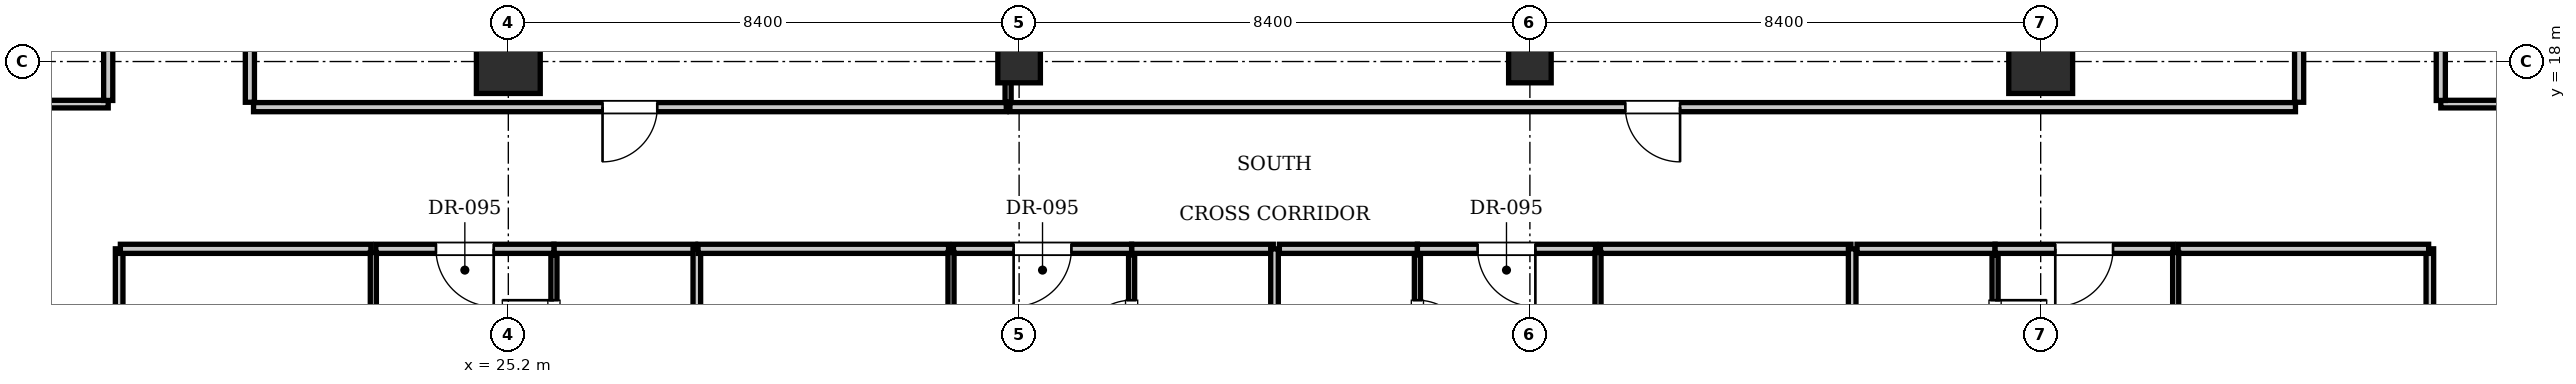
"""IFC4 building model, lengths in metres.
Left out: names, types, materials, properties, quantities, classifications, styles, units other than length and angle.
Written with IfcOpenShell. Run it as: python <this file> out.ifc"""

import sys

from ifc_helpers import new_model, si_unit, direction, frame, frame_2d, origin, origin_2d, place, context, subcontext, project, spatial, rectangle, i_section, extrude, element, fill, save


model = new_model("IFC4")
c1 = context("Model", 3, precision=1e-05, world=origin(), true_north=direction((0.0, 1.0)))
c2 = subcontext(c1, "Body", "Model", "MODEL_VIEW")
j1 = project(units=[si_unit("LENGTHUNIT", "METRE"), si_unit("PLANEANGLEUNIT", "RADIAN")], contexts=[c1])
p1 = place(None, origin())
s1 = spatial("IfcSite", under=j1, at=p1, CompositionType="ELEMENT")
p2 = place(p1, origin())
s2 = spatial("IfcBuilding", under=s1, at=p2, CompositionType="ELEMENT")
p3 = place(p2, frame((0.0, 0.0, 103.95)))
s3 = spatial("IfcBuildingStorey", under=s2, at=p3, CompositionType="ELEMENT", Elevation=103.95)
for number, where, z_axis, x_axis in (
    (1, (25.2, 18.0, 0.0), (0.0, 0.0, 1.0), (1.0, 0.0, 0.0)),
    (2, (50.4, 18.0, 0.0), (0.0, 0.0, 1.0), (1.0, 0.0, 0.0)),
):
    element("IfcColumn", number, at=place(p3, frame(where, z_axis=z_axis, x_axis=x_axis)), inside=s3, PredefinedType="COLUMN", context=c2, shape_type="SweptSolid", body=[
        extrude(rectangle(XDim=1.05, YDim=1.05, at=origin_2d()), origin(), (0.0, 0.0, 1.0), 3.85),
    ])
for number, where, z_axis, x_axis in (
    (3, (33.6, 18.0, 0.0), (0.0, 0.0, 1.0), (1.0, 0.0, 0.0)),
    (4, (42.0, 18.0, 0.0), (0.0, 0.0, 1.0), (1.0, 0.0, 0.0)),
):
    element("IfcColumn", number, at=place(p3, frame(where, z_axis=z_axis, x_axis=x_axis)), inside=s3, PredefinedType="COLUMN", context=c2, shape_type="SweptSolid", body=[
        extrude(i_section(OverallWidth=0.7, OverallDepth=0.7, WebThickness=0.028, FlangeThickness=0.044, at=origin_2d()), origin(), (0.0, 0.0, 1.0), 3.85),
    ])
p4 = place(p3, frame((20.95, 17.33, 0.0), z_axis=(0.0, 0.0, 1.0), x_axis=(0.0, 1.0, 0.0)))
e5 = element("IfcWall", 5, at=p4, inside=s3, PredefinedType="PARTITIONING", context=c2, shape_type="SweptSolid", body=[
    extrude(rectangle(XDim=7.33, YDim=0.15, at=frame_2d((3.665, 0.0))), origin(), (0.0, 0.0, 1.0), 3.255),
])
p5 = place(p3, frame((54.65, 17.33, 0.0), z_axis=(0.0, 0.0, 1.0), x_axis=(0.0, 1.0, 0.0)))
e6 = element("IfcWall", 6, at=p5, inside=s3, PredefinedType="PARTITIONING", context=c2, shape_type="SweptSolid", body=[
    extrude(rectangle(XDim=7.33, YDim=0.15, at=frame_2d((3.665, 0.0))), origin(), (0.0, 0.0, 1.0), 3.293),
])
p6 = place(p3, frame((21.01, 17.25, 0.0), z_axis=(0.0, 0.0, 1.0), x_axis=(1.0, 0.0, 0.0)))
e7 = element("IfcWall", 7, at=p6, inside=s3, PredefinedType="PARTITIONING", context=c2, shape_type="SweptSolid", body=[
    extrude(rectangle(XDim=12.379, YDim=0.15, at=frame_2d((6.189, 0.0))), origin(), (0.0, 0.0, 1.0), 3.61),
])
p7 = place(p6, frame((5.74, 0.0, 0.0)))
e8 = element("IfcOpeningElement", 8, at=p7, cuts=e7, PredefinedType="OPENING", context=c2, shape_type="SweptSolid", body=[
    extrude(rectangle(XDim=0.9, YDim=2.1, at=frame_2d((0.45, 1.05))), frame((0.0, 0.085, 0.0), z_axis=(0.0, -1.0, 0.0), x_axis=(1.0, 0.0, 0.0)), (0.0, 0.0, 1.0), 0.17),
])
p8 = place(p3, frame((33.419, 17.33, 0.0), z_axis=(0.0, 0.0, 1.0), x_axis=(0.0, 1.0, 0.0)))
e9 = element("IfcWall", 9, at=p8, inside=s3, PredefinedType="PARTITIONING", context=c2, shape_type="SweptSolid", body=[
    extrude(rectangle(XDim=7.33, YDim=0.1, at=frame_2d((3.665, 0.0))), origin(), (0.0, 0.0, 1.0), 2.999),
])
p9 = place(p3, frame((33.449, 17.25, 0.0), z_axis=(0.0, 0.0, 1.0), x_axis=(1.0, 0.0, 0.0)))
e10 = element("IfcWall", 10, at=p9, inside=s3, PredefinedType="PARTITIONING", context=c2, shape_type="SweptSolid", body=[
    extrude(rectangle(XDim=21.141, YDim=0.15, at=frame_2d((10.571, 0.0))), origin(), (0.0, 0.0, 1.0), 3.61),
])
p10 = place(p9, frame((10.121, 0.0, 0.0)))
e11 = element("IfcOpeningElement", 11, at=p10, cuts=e10, PredefinedType="OPENING", context=c2, shape_type="SweptSolid", body=[
    extrude(rectangle(XDim=0.9, YDim=2.1, at=frame_2d((0.45, 1.05))), frame((0.0, 0.085, 0.0), z_axis=(0.0, -1.0, 0.0), x_axis=(1.0, 0.0, 0.0)), (0.0, 0.0, 1.0), 0.17),
])
for number, where, z_axis, x_axis in (
    (12, (18.8, 0.1, 0.0), (0.0, 0.0, 1.0), (0.0, 1.0, 0.0)),
    (13, (56.8, 0.1, 0.0), (0.0, 0.0, 1.0), (0.0, 1.0, 0.0)),
):
    element("IfcWall", number, at=place(p3, frame(where, z_axis=z_axis, x_axis=x_axis)), inside=s3, PredefinedType="PARTITIONING", context=c2, shape_type="SweptSolid", body=[
        extrude(rectangle(XDim=14.82, YDim=0.125, at=frame_2d((7.41, 0.0))), origin(), (0.0, 0.0, 1.0), 3.61),
    ])
p11 = place(p3, frame((25.95, 14.92, 0.0), z_axis=(0.0, 0.0, 1.0), x_axis=(1.0, 0.0, 0.0)))
e14 = element("IfcWall", 14, at=p11, inside=s3, PredefinedType="PARTITIONING", context=c2, shape_type="SweptSolid", body=[
    extrude(rectangle(XDim=2.33, YDim=0.15, at=frame_2d((1.165, 0.0))), origin(), (0.0, 0.0, 1.0), 3.61),
])
p12 = place(p3, frame((25.95, 12.48, 0.0), z_axis=(0.0, 0.0, 1.0), x_axis=(0.0, 1.0, 0.0)))
e15 = element("IfcWall", 15, at=p12, inside=s3, PredefinedType="PARTITIONING", context=c2, shape_type="SweptSolid", body=[
    extrude(rectangle(XDim=2.34, YDim=0.1, at=frame_2d((1.17, 0.0))), origin(), (0.0, 0.0, 1.0), 3.61),
])
p13 = place(p12, frame((0.745, 0.0, 0.0)))
e16 = element("IfcOpeningElement", 16, at=p13, cuts=e15, PredefinedType="OPENING", context=c2, shape_type="SweptSolid", body=[
    extrude(rectangle(XDim=0.85, YDim=2.1, at=frame_2d((0.425, 1.05))), frame((0.0, 0.06, 0.0), z_axis=(0.0, -1.0, 0.0), x_axis=(1.0, 0.0, 0.0)), (0.0, 0.0, 1.0), 0.12),
])
p14 = place(p3, frame((18.82, 14.92, 0.0), z_axis=(0.0, 0.0, 1.0), x_axis=(1.0, 0.0, 0.0)))
e17 = element("IfcWall", 17, at=p14, inside=s3, PredefinedType="PARTITIONING", context=c2, shape_type="SweptSolid", body=[
    extrude(rectangle(XDim=4.12, YDim=0.15, at=frame_2d((2.06, 0.0))), origin(), (0.0, 0.0, 1.0), 3.61),
])
p15 = place(p3, frame((23.02, 14.92, 0.0), z_axis=(0.0, 0.0, 1.0), x_axis=(1.0, 0.0, 0.0)))
e18 = element("IfcWall", 18, at=p15, inside=s3, PredefinedType="PARTITIONING", context=c2, shape_type="SweptSolid", body=[
    extrude(rectangle(XDim=2.93, YDim=0.15, at=frame_2d((1.465, 0.0))), origin(), (0.0, 0.0, 1.0), 3.61),
])
p16 = place(p15, frame((0.99, 0.0, 0.0)))
e19 = element("IfcOpeningElement", 19, at=p16, cuts=e18, PredefinedType="OPENING", context=c2, shape_type="SweptSolid", body=[
    extrude(rectangle(XDim=0.95, YDim=2.15, at=frame_2d((0.475, 1.075))), frame((0.0, 0.085, 0.0), z_axis=(0.0, -1.0, 0.0), x_axis=(1.0, 0.0, 0.0)), (0.0, 0.0, 1.0), 0.17),
])
p17 = place(p3, frame((22.98, 0.03, 0.0), z_axis=(0.0, 0.0, 1.0), x_axis=(0.0, 1.0, 0.0)))
e20 = element("IfcWall", 20, at=p17, inside=s3, PredefinedType="PARTITIONING", context=c2, shape_type="SweptSolid", body=[
    extrude(rectangle(XDim=14.83, YDim=0.1, at=frame_2d((7.415, 0.0))), origin(), (0.0, 0.0, 1.0), 3.61),
])
p18 = place(p17, frame((1.6, 0.0, 0.0)))
e21 = element("IfcOpeningElement", 21, at=p18, cuts=e20, PredefinedType="OPENING", context=c2, shape_type="SweptSolid", body=[
    extrude(rectangle(XDim=0.9, YDim=2.1, at=frame_2d((0.45, 1.05))), frame((0.0, 0.06, 0.0), z_axis=(0.0, -1.0, 0.0), x_axis=(1.0, 0.0, 0.0)), (0.0, 0.0, 1.0), 0.12),
])
p19 = place(p3, frame((28.3, 0.1, 0.0), z_axis=(0.0, 0.0, 1.0), x_axis=(0.0, 1.0, 0.0)))
e22 = element("IfcWall", 22, at=p19, inside=s3, PredefinedType="PARTITIONING", context=c2, shape_type="SweptSolid", body=[
    extrude(rectangle(XDim=14.82, YDim=0.125, at=frame_2d((7.41, 0.0))), origin(), (0.0, 0.0, 1.0), 3.61),
])
p20 = place(p3, frame((35.45, 14.92, 0.0), z_axis=(0.0, 0.0, 1.0), x_axis=(1.0, 0.0, 0.0)))
e23 = element("IfcWall", 23, at=p20, inside=s3, PredefinedType="PARTITIONING", context=c2, shape_type="SweptSolid", body=[
    extrude(rectangle(XDim=2.33, YDim=0.15, at=frame_2d((1.165, 0.0))), origin(), (0.0, 0.0, 1.0), 3.61),
])
p21 = place(p3, frame((35.45, 12.48, 0.0), z_axis=(0.0, 0.0, 1.0), x_axis=(0.0, 1.0, 0.0)))
e24 = element("IfcWall", 24, at=p21, inside=s3, PredefinedType="PARTITIONING", context=c2, shape_type="SweptSolid", body=[
    extrude(rectangle(XDim=2.34, YDim=0.1, at=frame_2d((1.17, 0.0))), origin(), (0.0, 0.0, 1.0), 3.61),
])
p22 = place(p21, frame((0.745, 0.0, 0.0)))
e25 = element("IfcOpeningElement", 25, at=p22, cuts=e24, PredefinedType="OPENING", context=c2, shape_type="SweptSolid", body=[
    extrude(rectangle(XDim=0.85, YDim=2.1, at=frame_2d((0.425, 1.05))), frame((0.0, 0.06, 0.0), z_axis=(0.0, -1.0, 0.0), x_axis=(1.0, 0.0, 0.0)), (0.0, 0.0, 1.0), 0.12),
])
p23 = place(p3, frame((28.32, 14.92, 0.0), z_axis=(0.0, 0.0, 1.0), x_axis=(1.0, 0.0, 0.0)))
e26 = element("IfcWall", 26, at=p23, inside=s3, PredefinedType="PARTITIONING", context=c2, shape_type="SweptSolid", body=[
    extrude(rectangle(XDim=4.12, YDim=0.15, at=frame_2d((2.06, 0.0))), origin(), (0.0, 0.0, 1.0), 3.61),
])
p24 = place(p3, frame((32.52, 14.92, 0.0), z_axis=(0.0, 0.0, 1.0), x_axis=(1.0, 0.0, 0.0)))
e27 = element("IfcWall", 27, at=p24, inside=s3, PredefinedType="PARTITIONING", context=c2, shape_type="SweptSolid", body=[
    extrude(rectangle(XDim=2.93, YDim=0.15, at=frame_2d((1.465, 0.0))), origin(), (0.0, 0.0, 1.0), 3.61),
])
p25 = place(p24, frame((0.99, 0.0, 0.0)))
e28 = element("IfcOpeningElement", 28, at=p25, cuts=e27, PredefinedType="OPENING", context=c2, shape_type="SweptSolid", body=[
    extrude(rectangle(XDim=0.95, YDim=2.15, at=frame_2d((0.475, 1.075))), frame((0.0, 0.085, 0.0), z_axis=(0.0, -1.0, 0.0), x_axis=(1.0, 0.0, 0.0)), (0.0, 0.0, 1.0), 0.17),
])
p26 = place(p3, frame((32.48, 0.03, 0.0), z_axis=(0.0, 0.0, 1.0), x_axis=(0.0, 1.0, 0.0)))
e29 = element("IfcWall", 29, at=p26, inside=s3, PredefinedType="PARTITIONING", context=c2, shape_type="SweptSolid", body=[
    extrude(rectangle(XDim=14.83, YDim=0.1, at=frame_2d((7.415, 0.0))), origin(), (0.0, 0.0, 1.0), 3.61),
])
p27 = place(p26, frame((1.6, 0.0, 0.0)))
e30 = element("IfcOpeningElement", 30, at=p27, cuts=e29, PredefinedType="OPENING", context=c2, shape_type="SweptSolid", body=[
    extrude(rectangle(XDim=0.9, YDim=2.1, at=frame_2d((0.45, 1.05))), frame((0.0, 0.06, 0.0), z_axis=(0.0, -1.0, 0.0), x_axis=(1.0, 0.0, 0.0)), (0.0, 0.0, 1.0), 0.12),
])
p28 = place(p3, frame((37.8, 0.1, 0.0), z_axis=(0.0, 0.0, 1.0), x_axis=(0.0, 1.0, 0.0)))
e31 = element("IfcWall", 31, at=p28, inside=s3, PredefinedType="PARTITIONING", context=c2, shape_type="SweptSolid", body=[
    extrude(rectangle(XDim=14.82, YDim=0.125, at=frame_2d((7.41, 0.0))), origin(), (0.0, 0.0, 1.0), 3.403),
])
p29 = place(p3, frame((37.88, 14.92, 0.0), z_axis=(0.0, 0.0, 1.0), x_axis=(1.0, 0.0, 0.0)))
e32 = element("IfcWall", 32, at=p29, inside=s3, PredefinedType="PARTITIONING", context=c2, shape_type="SweptSolid", body=[
    extrude(rectangle(XDim=2.27, YDim=0.15, at=frame_2d((1.135, 0.0))), origin(), (0.0, 0.0, 1.0), 3.61),
])
p30 = place(p3, frame((40.15, 12.48, 0.0), z_axis=(0.0, 0.0, 1.0), x_axis=(0.0, 1.0, 0.0)))
e33 = element("IfcWall", 33, at=p30, inside=s3, PredefinedType="PARTITIONING", context=c2, shape_type="SweptSolid", body=[
    extrude(rectangle(XDim=2.34, YDim=0.1, at=frame_2d((1.17, 0.0))), origin(), (0.0, 0.0, 1.0), 3.61),
])
p31 = place(p30, frame((0.745, 0.0, 0.0)))
e34 = element("IfcOpeningElement", 34, at=p31, cuts=e33, PredefinedType="OPENING", context=c2, shape_type="SweptSolid", body=[
    extrude(rectangle(XDim=0.85, YDim=2.1, at=frame_2d((0.425, 1.05))), frame((0.0, 0.06, 0.0), z_axis=(0.0, -1.0, 0.0), x_axis=(1.0, 0.0, 0.0)), (0.0, 0.0, 1.0), 0.12),
])
p32 = place(p3, frame((40.15, 14.92, 0.0), z_axis=(0.0, 0.0, 1.0), x_axis=(1.0, 0.0, 0.0)))
e35 = element("IfcWall", 35, at=p32, inside=s3, PredefinedType="PARTITIONING", context=c2, shape_type="SweptSolid", body=[
    extrude(rectangle(XDim=2.93, YDim=0.15, at=frame_2d((1.465, 0.0))), origin(), (0.0, 0.0, 1.0), 3.61),
])
p33 = place(p32, frame((0.99, 0.0, 0.0)))
e36 = element("IfcOpeningElement", 36, at=p33, cuts=e35, PredefinedType="OPENING", context=c2, shape_type="SweptSolid", body=[
    extrude(rectangle(XDim=0.95, YDim=2.15, at=frame_2d((0.475, 1.075))), frame((0.0, 0.085, 0.0), z_axis=(0.0, -1.0, 0.0), x_axis=(1.0, 0.0, 0.0)), (0.0, 0.0, 1.0), 0.17),
])
p34 = place(p3, frame((43.16, 14.92, 0.0), z_axis=(0.0, 0.0, 1.0), x_axis=(1.0, 0.0, 0.0)))
e37 = element("IfcWall", 37, at=p34, inside=s3, PredefinedType="PARTITIONING", context=c2, shape_type="SweptSolid", body=[
    extrude(rectangle(XDim=4.12, YDim=0.15, at=frame_2d((2.06, 0.0))), origin(), (0.0, 0.0, 1.0), 3.61),
])
p35 = place(p3, frame((43.12, 0.03, 0.0), z_axis=(0.0, 0.0, 1.0), x_axis=(0.0, 1.0, 0.0)))
e38 = element("IfcWall", 38, at=p35, inside=s3, PredefinedType="PARTITIONING", context=c2, shape_type="SweptSolid", body=[
    extrude(rectangle(XDim=14.83, YDim=0.1, at=frame_2d((7.415, 0.0))), origin(), (0.0, 0.0, 1.0), 3.61),
])
p36 = place(p35, frame((1.6, 0.0, 0.0)))
e39 = element("IfcOpeningElement", 39, at=p36, cuts=e38, PredefinedType="OPENING", context=c2, shape_type="SweptSolid", body=[
    extrude(rectangle(XDim=0.9, YDim=2.1, at=frame_2d((0.45, 1.05))), frame((0.0, 0.06, 0.0), z_axis=(0.0, -1.0, 0.0), x_axis=(1.0, 0.0, 0.0)), (0.0, 0.0, 1.0), 0.12),
])
p37 = place(p3, frame((47.3, 0.1, 0.0), z_axis=(0.0, 0.0, 1.0), x_axis=(0.0, 1.0, 0.0)))
e40 = element("IfcWall", 40, at=p37, inside=s3, PredefinedType="PARTITIONING", context=c2, shape_type="SweptSolid", body=[
    extrude(rectangle(XDim=14.82, YDim=0.125, at=frame_2d((7.41, 0.0))), origin(), (0.0, 0.0, 1.0), 3.61),
])
p38 = place(p3, frame((47.38, 14.92, 0.0), z_axis=(0.0, 0.0, 1.0), x_axis=(1.0, 0.0, 0.0)))
e41 = element("IfcWall", 41, at=p38, inside=s3, PredefinedType="PARTITIONING", context=c2, shape_type="SweptSolid", body=[
    extrude(rectangle(XDim=2.27, YDim=0.15, at=frame_2d((1.135, 0.0))), origin(), (0.0, 0.0, 1.0), 3.61),
])
p39 = place(p3, frame((49.65, 12.48, 0.0), z_axis=(0.0, 0.0, 1.0), x_axis=(0.0, 1.0, 0.0)))
e42 = element("IfcWall", 42, at=p39, inside=s3, PredefinedType="PARTITIONING", context=c2, shape_type="SweptSolid", body=[
    extrude(rectangle(XDim=2.34, YDim=0.1, at=frame_2d((1.17, 0.0))), origin(), (0.0, 0.0, 1.0), 3.61),
])
p40 = place(p39, frame((0.745, 0.0, 0.0)))
e43 = element("IfcOpeningElement", 43, at=p40, cuts=e42, PredefinedType="OPENING", context=c2, shape_type="SweptSolid", body=[
    extrude(rectangle(XDim=0.85, YDim=2.1, at=frame_2d((0.425, 1.05))), frame((0.0, 0.06, 0.0), z_axis=(0.0, -1.0, 0.0), x_axis=(1.0, 0.0, 0.0)), (0.0, 0.0, 1.0), 0.12),
])
p41 = place(p3, frame((49.65, 14.92, 0.0), z_axis=(0.0, 0.0, 1.0), x_axis=(1.0, 0.0, 0.0)))
e44 = element("IfcWall", 44, at=p41, inside=s3, PredefinedType="PARTITIONING", context=c2, shape_type="SweptSolid", body=[
    extrude(rectangle(XDim=2.93, YDim=0.15, at=frame_2d((1.465, 0.0))), origin(), (0.0, 0.0, 1.0), 3.61),
])
p42 = place(p41, frame((0.99, 0.0, 0.0)))
e45 = element("IfcOpeningElement", 45, at=p42, cuts=e44, PredefinedType="OPENING", context=c2, shape_type="SweptSolid", body=[
    extrude(rectangle(XDim=0.95, YDim=2.15, at=frame_2d((0.475, 1.075))), frame((0.0, 0.085, 0.0), z_axis=(0.0, -1.0, 0.0), x_axis=(1.0, 0.0, 0.0)), (0.0, 0.0, 1.0), 0.17),
])
p43 = place(p3, frame((52.66, 14.92, 0.0), z_axis=(0.0, 0.0, 1.0), x_axis=(1.0, 0.0, 0.0)))
e46 = element("IfcWall", 46, at=p43, inside=s3, PredefinedType="PARTITIONING", context=c2, shape_type="SweptSolid", body=[
    extrude(rectangle(XDim=4.12, YDim=0.15, at=frame_2d((2.06, 0.0))), origin(), (0.0, 0.0, 1.0), 3.61),
])
p44 = place(p3, frame((52.62, 0.03, 0.0), z_axis=(0.0, 0.0, 1.0), x_axis=(0.0, 1.0, 0.0)))
e47 = element("IfcWall", 47, at=p44, inside=s3, PredefinedType="PARTITIONING", context=c2, shape_type="SweptSolid", body=[
    extrude(rectangle(XDim=14.83, YDim=0.1, at=frame_2d((7.415, 0.0))), origin(), (0.0, 0.0, 1.0), 3.61),
])
p45 = place(p44, frame((1.6, 0.0, 0.0)))
e48 = element("IfcOpeningElement", 48, at=p45, cuts=e47, PredefinedType="OPENING", context=c2, shape_type="SweptSolid", body=[
    extrude(rectangle(XDim=0.9, YDim=2.1, at=frame_2d((0.45, 1.05))), frame((0.0, 0.06, 0.0), z_axis=(0.0, -1.0, 0.0), x_axis=(1.0, 0.0, 0.0)), (0.0, 0.0, 1.0), 0.12),
])
p46 = place(p3, frame((10.9, 17.3, 0.0), z_axis=(0.0, 0.0, 1.0), x_axis=(1.0, 0.0, 0.0)))
e49 = element("IfcWall", 49, at=p46, inside=s3, PredefinedType="PARTITIONING", context=c2, shape_type="SweptSolid", body=[
    extrude(rectangle(XDim=7.72, YDim=0.125, at=frame_2d((3.86, 0.0))), origin(), (0.0, 0.0, 1.0), 3.61),
])
p47 = place(p3, frame((56.98, 17.3, 0.0), z_axis=(0.0, 0.0, 1.0), x_axis=(1.0, 0.0, 0.0)))
e50 = element("IfcWall", 50, at=p47, inside=s3, PredefinedType="PARTITIONING", context=c2, shape_type="SweptSolid", body=[
    extrude(rectangle(XDim=7.72, YDim=0.125, at=frame_2d((3.86, 0.0))), origin(), (0.0, 0.0, 1.0), 3.61),
])
for number, where, z_axis, x_axis in (
    (51, (18.62, 17.36, 0.0), (0.0, 0.0, 1.0), (0.0, 1.0, 0.0)),
    (52, (56.98, 17.36, 0.0), (0.0, 0.0, 1.0), (0.0, 1.0, 0.0)),
):
    element("IfcWall", number, at=place(p3, frame(where, z_axis=z_axis, x_axis=x_axis)), inside=s3, PredefinedType="PARTITIONING", context=c2, shape_type="SweptSolid", body=[
        extrude(rectangle(XDim=1.89, YDim=0.15, at=frame_2d((0.945, 0.0))), origin(), (0.0, 0.0, 1.0), 3.61),
    ])
p48 = place(p7, frame((0.9, 0.0, 0.0), z_axis=(0.0, 0.0, 1.0), x_axis=(-1.0, 0.0, 0.0)))
e53 = element("IfcDoor", 53, at=p48, inside=s3, OperationType="SINGLE_SWING_RIGHT", PredefinedType="DOOR", context=c2, shape_type="SweptSolid", body=[
    extrude(rectangle(XDim=0.9, YDim=2.1, at=frame_2d((0.45, 1.05))), frame((0.0, 0.025, 0.0), z_axis=(0.0, -1.0, 0.0), x_axis=(1.0, 0.0, 0.0)), (0.0, 0.0, 1.0), 0.05),
])
fill(e8, e53)
p49 = place(p10, frame((0.9, 0.0, 0.0), z_axis=(0.0, 0.0, 1.0), x_axis=(-1.0, 0.0, 0.0)))
e54 = element("IfcDoor", 54, at=p49, inside=s3, OperationType="SINGLE_SWING_LEFT", PredefinedType="DOOR", context=c2, shape_type="SweptSolid", body=[
    extrude(rectangle(XDim=0.9, YDim=2.1, at=frame_2d((0.45, 1.05))), frame((0.0, 0.025, 0.0), z_axis=(0.0, -1.0, 0.0), x_axis=(1.0, 0.0, 0.0)), (0.0, 0.0, 1.0), 0.05),
])
fill(e11, e54)
p50 = place(p13, origin())
e55 = element("IfcDoor", 55, at=p50, inside=s3, OperationType="SINGLE_SWING_RIGHT", PredefinedType="DOOR", context=c2, shape_type="SweptSolid", body=[
    extrude(rectangle(XDim=0.85, YDim=2.1, at=frame_2d((0.425, 1.05))), frame((0.0, 0.025, 0.0), z_axis=(0.0, -1.0, 0.0), x_axis=(1.0, 0.0, 0.0)), (0.0, 0.0, 1.0), 0.05),
])
fill(e16, e55)
p51 = place(p16, frame((0.95, 0.0, 0.0), z_axis=(0.0, 0.0, 1.0), x_axis=(-1.0, 0.0, 0.0)))
e56 = element("IfcDoor", 56, at=p51, inside=s3, OperationType="SINGLE_SWING_LEFT", PredefinedType="DOOR", context=c2, shape_type="SweptSolid", body=[
    extrude(rectangle(XDim=0.95, YDim=2.15, at=frame_2d((0.475, 1.075))), frame((0.0, 0.025, 0.0), z_axis=(0.0, -1.0, 0.0), x_axis=(1.0, 0.0, 0.0)), (0.0, 0.0, 1.0), 0.05),
])
fill(e19, e56)
p52 = place(p22, origin())
e57 = element("IfcDoor", 57, at=p52, inside=s3, OperationType="SINGLE_SWING_LEFT", PredefinedType="DOOR", context=c2, shape_type="SweptSolid", body=[
    extrude(rectangle(XDim=0.85, YDim=2.1, at=frame_2d((0.425, 1.05))), frame((0.0, 0.025, 0.0), z_axis=(0.0, -1.0, 0.0), x_axis=(1.0, 0.0, 0.0)), (0.0, 0.0, 1.0), 0.05),
])
fill(e25, e57)
p53 = place(p25, frame((0.95, 0.0, 0.0), z_axis=(0.0, 0.0, 1.0), x_axis=(-1.0, 0.0, 0.0)))
e58 = element("IfcDoor", 58, at=p53, inside=s3, OperationType="SINGLE_SWING_RIGHT", PredefinedType="DOOR", context=c2, shape_type="SweptSolid", body=[
    extrude(rectangle(XDim=0.95, YDim=2.15, at=frame_2d((0.475, 1.075))), frame((0.0, 0.025, 0.0), z_axis=(0.0, -1.0, 0.0), x_axis=(1.0, 0.0, 0.0)), (0.0, 0.0, 1.0), 0.05),
])
fill(e28, e58)
p54 = place(p31, frame((0.85, 0.0, 0.0), z_axis=(0.0, 0.0, 1.0), x_axis=(-1.0, 0.0, 0.0)))
e59 = element("IfcDoor", 59, at=p54, inside=s3, OperationType="SINGLE_SWING_RIGHT", PredefinedType="DOOR", context=c2, shape_type="SweptSolid", body=[
    extrude(rectangle(XDim=0.85, YDim=2.1, at=frame_2d((0.425, 1.05))), frame((0.0, 0.025, 0.0), z_axis=(0.0, -1.0, 0.0), x_axis=(1.0, 0.0, 0.0)), (0.0, 0.0, 1.0), 0.05),
])
fill(e34, e59)
p55 = place(p33, frame((0.95, 0.0, 0.0), z_axis=(0.0, 0.0, 1.0), x_axis=(-1.0, 0.0, 0.0)))
e60 = element("IfcDoor", 60, at=p55, inside=s3, OperationType="SINGLE_SWING_LEFT", PredefinedType="DOOR", context=c2, shape_type="SweptSolid", body=[
    extrude(rectangle(XDim=0.95, YDim=2.15, at=frame_2d((0.475, 1.075))), frame((0.0, 0.025, 0.0), z_axis=(0.0, -1.0, 0.0), x_axis=(1.0, 0.0, 0.0)), (0.0, 0.0, 1.0), 0.05),
])
fill(e36, e60)
p56 = place(p40, frame((0.85, 0.0, 0.0), z_axis=(0.0, 0.0, 1.0), x_axis=(-1.0, 0.0, 0.0)))
e61 = element("IfcDoor", 61, at=p56, inside=s3, OperationType="SINGLE_SWING_LEFT", PredefinedType="DOOR", context=c2, shape_type="SweptSolid", body=[
    extrude(rectangle(XDim=0.85, YDim=2.1, at=frame_2d((0.425, 1.05))), frame((0.0, 0.025, 0.0), z_axis=(0.0, -1.0, 0.0), x_axis=(1.0, 0.0, 0.0)), (0.0, 0.0, 1.0), 0.05),
])
fill(e43, e61)
p57 = place(p42, frame((0.95, 0.0, 0.0), z_axis=(0.0, 0.0, 1.0), x_axis=(-1.0, 0.0, 0.0)))
e62 = element("IfcDoor", 62, at=p57, inside=s3, OperationType="SINGLE_SWING_RIGHT", PredefinedType="DOOR", context=c2, shape_type="SweptSolid", body=[
    extrude(rectangle(XDim=0.95, YDim=2.15, at=frame_2d((0.475, 1.075))), frame((0.0, 0.025, 0.0), z_axis=(0.0, -1.0, 0.0), x_axis=(1.0, 0.0, 0.0)), (0.0, 0.0, 1.0), 0.05),
])
fill(e45, e62)
save(model, sys.argv[1])
